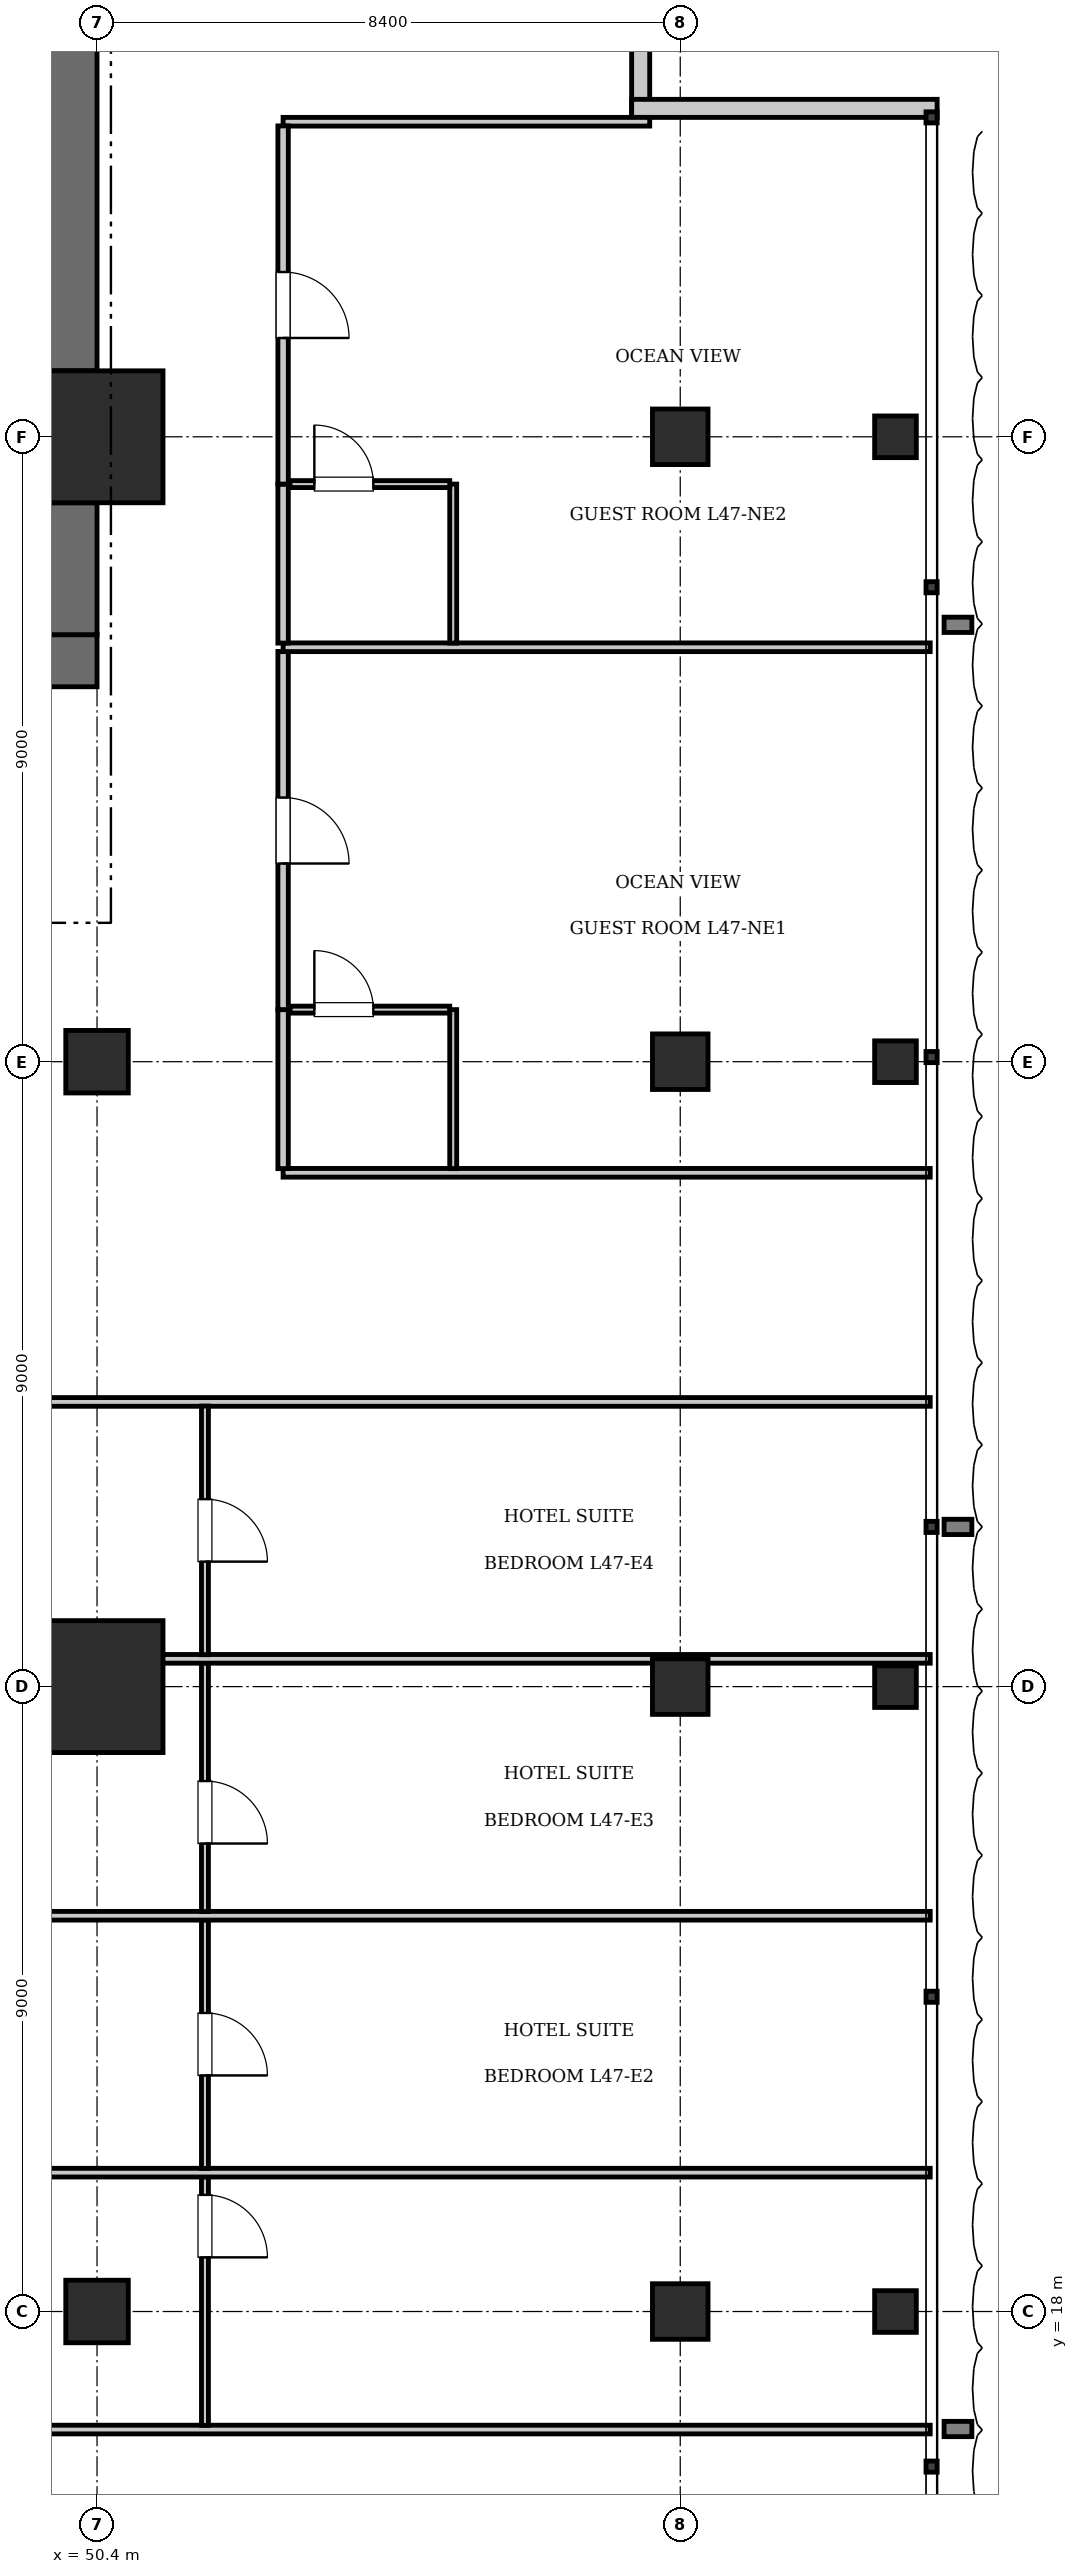
"""IFC4 building model, lengths in metres.
Left out: names, types, materials, properties, quantities, classifications, styles, units other than length and angle.
Written with IfcOpenShell. Run it as: python <this file> out.ifc"""

import sys

from ifc_helpers import new_model, si_unit, direction, frame, frame_2d, origin, origin_2d, place, context, subcontext, project, spatial, rectangle, i_section, extrude, element, fill, save


model = new_model("IFC4")
c1 = context("Model", 3, precision=1e-05, world=origin(), true_north=direction((0.0, 1.0)))
c2 = subcontext(c1, "Body", "Model", "MODEL_VIEW")
j1 = project(units=[si_unit("LENGTHUNIT", "METRE"), si_unit("PLANEANGLEUNIT", "RADIAN")], contexts=[c1])
p1 = place(None, origin())
s1 = spatial("IfcSite", under=j1, at=p1, CompositionType="ELEMENT")
p2 = place(p1, origin())
s2 = spatial("IfcBuilding", under=s1, at=p2, CompositionType="ELEMENT")
p3 = place(p2, frame((0.0, 0.0, 192.85)))
s3 = spatial("IfcBuildingStorey", under=s2, at=p3, CompositionType="ELEMENT", Elevation=192.85)
for number, where, z_axis, x_axis in (
    (1, (50.4, 27.0, 0.0), (0.0, 0.0, 1.0), (1.0, 0.0, 0.0)),
    (2, (50.4, 45.0, 0.0), (0.0, 0.0, 1.0), (1.0, 0.0, 0.0)),
):
    element("IfcColumn", number, at=place(p3, frame(where, z_axis=z_axis, x_axis=x_axis)), inside=s3, PredefinedType="COLUMN", context=c2, shape_type="SweptSolid", body=[
        extrude(rectangle(XDim=1.9, YDim=1.9, at=origin_2d()), origin(), (0.0, 0.0, 1.0), 3.85),
    ])
p4 = place(p3, frame((43.6, 41.775, 0.0), z_axis=(0.0, 0.0, 1.0), x_axis=(1.0, 0.0, 0.0)))
e3 = element("IfcWall", 3, at=p4, inside=s3, PredefinedType="SHEAR", context=c2, shape_type="SweptSolid", body=[
    extrude(rectangle(XDim=6.8, YDim=0.75, at=frame_2d((3.4, 0.0))), origin(), (0.0, 0.0, 1.0), 3.85),
])
p5 = place(p4, frame((3.9, 0.0, 0.0)))
e4 = element("IfcOpeningElement", 4, at=p5, cuts=e3, PredefinedType="OPENING", context=c2, shape_type="SweptSolid", body=[
    extrude(rectangle(XDim=1.15, YDim=2.15, at=frame_2d((0.575, 1.075))), frame((0.0, 0.385, 0.0), z_axis=(0.0, -1.0, 0.0), x_axis=(1.0, 0.0, 0.0)), (0.0, 0.0, 1.0), 0.77),
])
p6 = place(p4, frame((0.55, 0.0, 0.0)))
e5 = element("IfcOpeningElement", 5, at=p6, cuts=e3, PredefinedType="OPENING", context=c2, shape_type="SweptSolid", body=[
    extrude(rectangle(XDim=1.1, YDim=2.2, at=frame_2d((0.55, 1.1))), frame((0.0, 0.385, 0.0), z_axis=(0.0, -1.0, 0.0), x_axis=(1.0, 0.0, 0.0)), (0.0, 0.0, 1.0), 0.77),
])
p7 = place(p3, frame((50.025, 42.15, 0.0), z_axis=(0.0, 0.0, 1.0), x_axis=(0.0, 1.0, 0.0)))
e6 = element("IfcWall", 6, at=p7, inside=s3, PredefinedType="SHEAR", context=c2, shape_type="SweptSolid", body=[
    extrude(rectangle(XDim=1.9, YDim=0.75, at=frame_2d((0.95, 0.0))), origin(), (0.0, 0.0, 1.0), 3.85),
])
p8 = place(p3, frame((50.025, 45.95, 0.0), z_axis=(0.0, 0.0, 1.0), x_axis=(0.0, 1.0, 0.0)))
e7 = element("IfcWall", 7, at=p8, inside=s3, PredefinedType="SHEAR", context=c2, shape_type="SweptSolid", body=[
    extrude(rectangle(XDim=7.3, YDim=0.75, at=frame_2d((3.65, 0.0))), origin(), (0.0, 0.0, 1.0), 3.85),
])
for number, where, z_axis, x_axis in (
    (8, (50.4, 36.0, 0.0), (0.0, 0.0, 1.0), (1.0, 0.0, 0.0)),
    (9, (50.4, 18.0, 0.0), (0.0, 0.0, 1.0), (1.0, 0.0, 0.0)),
):
    element("IfcColumn", number, at=place(p3, frame(where, z_axis=z_axis, x_axis=x_axis)), inside=s3, PredefinedType="COLUMN", context=c2, shape_type="SweptSolid", body=[
        extrude(rectangle(XDim=0.9, YDim=0.9, at=origin_2d()), origin(), (0.0, 0.0, 1.0), 3.85),
    ])
for number, where, z_axis, x_axis in (
    (10, (58.8, 18.0, 0.0), (0.0, 0.0, 1.0), (1.0, 0.0, 0.0)),
    (11, (58.8, 27.0, 0.0), (0.0, 0.0, 1.0), (1.0, 0.0, 0.0)),
    (12, (58.8, 36.0, 0.0), (0.0, 0.0, 1.0), (1.0, 0.0, 0.0)),
    (13, (58.8, 45.0, 0.0), (0.0, 0.0, 1.0), (1.0, 0.0, 0.0)),
):
    element("IfcColumn", number, at=place(p3, frame(where, z_axis=z_axis, x_axis=x_axis)), inside=s3, PredefinedType="COLUMN", context=c2, shape_type="SweptSolid", body=[
        extrude(rectangle(XDim=0.8, YDim=0.8, at=origin_2d()), origin(), (0.0, 0.0, 1.0), 3.85),
    ])
for number, where, z_axis, x_axis in (
    (14, (61.9, 18.0, 0.0), (0.0, 0.0, 1.0), (1.0, 0.0, 0.0)),
    (15, (61.9, 27.0, 0.0), (0.0, 0.0, 1.0), (1.0, 0.0, 0.0)),
    (16, (61.9, 36.0, 0.0), (0.0, 0.0, 1.0), (1.0, 0.0, 0.0)),
    (17, (61.9, 45.0, 0.0), (0.0, 0.0, 1.0), (1.0, 0.0, 0.0)),
):
    element("IfcColumn", number, at=place(p3, frame(where, z_axis=z_axis, x_axis=x_axis)), inside=s3, PredefinedType="COLUMN", context=c2, shape_type="SweptSolid", body=[
        extrude(i_section(OverallWidth=0.6, OverallDepth=0.6, WebThickness=0.025, FlangeThickness=0.038, at=origin_2d()), origin(), (0.0, 0.0, 1.0), 3.85),
    ])
for number, where, z_axis, x_axis in (
    (18, (58.23, 54.0, 0.0), (0.0, 0.0, 1.0), (0.0, -1.0, 0.0)),
    (19, (58.1, 49.73, 0.0), (0.0, 0.0, 1.0), (1.0, 0.0, 0.0)),
):
    element("IfcWall", number, at=place(p3, frame(where, z_axis=z_axis, x_axis=x_axis)), inside=s3, PredefinedType="SOLIDWALL", context=c2, shape_type="SweptSolid", body=[
        extrude(rectangle(XDim=4.4, YDim=0.26, at=frame_2d((2.2, 0.0))), origin(), (0.0, 0.0, 1.0), 3.61),
    ])
for number, where, z_axis, x_axis in (
    (20, (38.08, 16.3, 0.0), (0.0, 0.0, 1.0), (1.0, 0.0, 0.0)),
    (21, (38.08, 31.1, 0.0), (0.0, 0.0, 1.0), (1.0, 0.0, 0.0)),
):
    element("IfcWall", number, at=place(p3, frame(where, z_axis=z_axis, x_axis=x_axis)), inside=s3, PredefinedType="PARTITIONING", context=c2, shape_type="SweptSolid", body=[
        extrude(rectangle(XDim=24.32, YDim=0.125, at=frame_2d((12.16, 0.0))), origin(), (0.0, 0.0, 1.0), 3.61),
    ])
p9 = place(p3, frame((51.954, 16.36, 0.0), z_axis=(0.0, 0.0, 1.0), x_axis=(0.0, 1.0, 0.0)))
e22 = element("IfcWall", 22, at=p9, inside=s3, PredefinedType="PARTITIONING", context=c2, shape_type="SweptSolid", body=[
    extrude(rectangle(XDim=3.58, YDim=0.1, at=frame_2d((1.79, 0.0))), origin(), (0.0, 0.0, 1.0), 3.61),
])
p10 = place(p9, frame((2.42, 0.0, 0.0)))
e23 = element("IfcOpeningElement", 23, at=p10, cuts=e22, PredefinedType="OPENING", context=c2, shape_type="SweptSolid", body=[
    extrude(rectangle(XDim=0.9, YDim=2.1, at=frame_2d((0.45, 1.05))), frame((0.0, 0.06, 0.0), z_axis=(0.0, -1.0, 0.0), x_axis=(1.0, 0.0, 0.0)), (0.0, 0.0, 1.0), 0.12),
])
p11 = place(p3, frame((38.08, 20.0, 0.0), z_axis=(0.0, 0.0, 1.0), x_axis=(1.0, 0.0, 0.0)))
e24 = element("IfcWall", 24, at=p11, inside=s3, PredefinedType="PARTITIONING", context=c2, shape_type="SweptSolid", body=[
    extrude(rectangle(XDim=24.32, YDim=0.125, at=frame_2d((12.16, 0.0))), origin(), (0.0, 0.0, 1.0), 3.61),
])
p12 = place(p3, frame((51.954, 20.06, 0.0), z_axis=(0.0, 0.0, 1.0), x_axis=(0.0, 1.0, 0.0)))
e25 = element("IfcWall", 25, at=p12, inside=s3, PredefinedType="PARTITIONING", context=c2, shape_type="SweptSolid", body=[
    extrude(rectangle(XDim=3.58, YDim=0.1, at=frame_2d((1.79, 0.0))), origin(), (0.0, 0.0, 1.0), 3.61),
])
p13 = place(p12, frame((1.34, 0.0, 0.0)))
e26 = element("IfcOpeningElement", 26, at=p13, cuts=e25, PredefinedType="OPENING", context=c2, shape_type="SweptSolid", body=[
    extrude(rectangle(XDim=0.9, YDim=2.1, at=frame_2d((0.45, 1.05))), frame((0.0, 0.06, 0.0), z_axis=(0.0, -1.0, 0.0), x_axis=(1.0, 0.0, 0.0)), (0.0, 0.0, 1.0), 0.12),
])
p14 = place(p3, frame((38.08, 23.7, 0.0), z_axis=(0.0, 0.0, 1.0), x_axis=(1.0, 0.0, 0.0)))
e27 = element("IfcWall", 27, at=p14, inside=s3, PredefinedType="PARTITIONING", context=c2, shape_type="SweptSolid", body=[
    extrude(rectangle(XDim=24.32, YDim=0.125, at=frame_2d((12.16, 0.0))), origin(), (0.0, 0.0, 1.0), 3.61),
])
p15 = place(p3, frame((51.954, 23.76, 0.0), z_axis=(0.0, 0.0, 1.0), x_axis=(0.0, 1.0, 0.0)))
e28 = element("IfcWall", 28, at=p15, inside=s3, PredefinedType="PARTITIONING", context=c2, shape_type="SweptSolid", body=[
    extrude(rectangle(XDim=3.58, YDim=0.1, at=frame_2d((1.79, 0.0))), origin(), (0.0, 0.0, 1.0), 3.61),
])
p16 = place(p15, frame((0.98, 0.0, 0.0)))
e29 = element("IfcOpeningElement", 29, at=p16, cuts=e28, PredefinedType="OPENING", context=c2, shape_type="SweptSolid", body=[
    extrude(rectangle(XDim=0.9, YDim=2.1, at=frame_2d((0.45, 1.05))), frame((0.0, 0.06, 0.0), z_axis=(0.0, -1.0, 0.0), x_axis=(1.0, 0.0, 0.0)), (0.0, 0.0, 1.0), 0.12),
])
p17 = place(p3, frame((38.08, 27.4, 0.0), z_axis=(0.0, 0.0, 1.0), x_axis=(1.0, 0.0, 0.0)))
e30 = element("IfcWall", 30, at=p17, inside=s3, PredefinedType="PARTITIONING", context=c2, shape_type="SweptSolid", body=[
    extrude(rectangle(XDim=24.32, YDim=0.125, at=frame_2d((12.16, 0.0))), origin(), (0.0, 0.0, 1.0), 3.61),
])
p18 = place(p3, frame((51.954, 27.46, 0.0), z_axis=(0.0, 0.0, 1.0), x_axis=(0.0, 1.0, 0.0)))
e31 = element("IfcWall", 31, at=p18, inside=s3, PredefinedType="PARTITIONING", context=c2, shape_type="SweptSolid", body=[
    extrude(rectangle(XDim=3.58, YDim=0.1, at=frame_2d((1.79, 0.0))), origin(), (0.0, 0.0, 1.0), 3.61),
])
p19 = place(p18, frame((1.34, 0.0, 0.0)))
e32 = element("IfcOpeningElement", 32, at=p19, cuts=e31, PredefinedType="OPENING", context=c2, shape_type="SweptSolid", body=[
    extrude(rectangle(XDim=0.9, YDim=2.1, at=frame_2d((0.45, 1.05))), frame((0.0, 0.06, 0.0), z_axis=(0.0, -1.0, 0.0), x_axis=(1.0, 0.0, 0.0)), (0.0, 0.0, 1.0), 0.12),
])
p20 = place(p3, frame((53.08, 34.4, 0.0), z_axis=(0.0, 0.0, 1.0), x_axis=(1.0, 0.0, 0.0)))
e33 = element("IfcWall", 33, at=p20, inside=s3, PredefinedType="PARTITIONING", context=c2, shape_type="SweptSolid", body=[
    extrude(rectangle(XDim=9.32, YDim=0.125, at=frame_2d((4.66, 0.0))), origin(), (0.0, 0.0, 1.0), 3.61),
])
p21 = place(p3, frame((53.08, 49.538, 0.0), z_axis=(0.0, 0.0, 1.0), x_axis=(1.0, 0.0, 0.0)))
e34 = element("IfcWall", 34, at=p21, inside=s3, PredefinedType="PARTITIONING", context=c2, shape_type="SweptSolid", body=[
    extrude(rectangle(XDim=5.28, YDim=0.125, at=frame_2d((2.64, 0.0))), origin(), (0.0, 0.0, 1.0), 3.61),
])
p22 = place(p3, frame((53.08, 34.46, 0.0), z_axis=(0.0, 0.0, 1.0), x_axis=(0.0, 1.0, 0.0)))
e35 = element("IfcWall", 35, at=p22, inside=s3, PredefinedType="PARTITIONING", context=c2, shape_type="SweptSolid", body=[
    extrude(rectangle(XDim=2.29, YDim=0.15, at=frame_2d((1.145, 0.0))), origin(), (0.0, 0.0, 1.0), 3.61),
])
p23 = place(p3, frame((53.08, 36.75, 0.0), z_axis=(0.0, 0.0, 1.0), x_axis=(0.0, 1.0, 0.0)))
e36 = element("IfcWall", 36, at=p23, inside=s3, PredefinedType="PARTITIONING", context=c2, shape_type="SweptSolid", body=[
    extrude(rectangle(XDim=5.159, YDim=0.15, at=frame_2d((2.579, 0.0))), origin(), (0.0, 0.0, 1.0), 3.61),
])
p24 = place(p23, frame((2.104, 0.0, 0.0)))
e37 = element("IfcOpeningElement", 37, at=p24, cuts=e36, PredefinedType="OPENING", context=c2, shape_type="SweptSolid", body=[
    extrude(rectangle(XDim=0.95, YDim=2.15, at=frame_2d((0.475, 1.075))), frame((0.0, 0.085, 0.0), z_axis=(0.0, -1.0, 0.0), x_axis=(1.0, 0.0, 0.0)), (0.0, 0.0, 1.0), 0.17),
])
p25 = place(p3, frame((55.53, 34.46, 0.0), z_axis=(0.0, 0.0, 1.0), x_axis=(0.0, 1.0, 0.0)))
e38 = element("IfcWall", 38, at=p25, inside=s3, PredefinedType="PARTITIONING", context=c2, shape_type="SweptSolid", body=[
    extrude(rectangle(XDim=2.29, YDim=0.1, at=frame_2d((1.145, 0.0))), origin(), (0.0, 0.0, 1.0), 3.61),
])
p26 = place(p3, frame((53.18, 36.75, 0.0), z_axis=(0.0, 0.0, 1.0), x_axis=(1.0, 0.0, 0.0)))
e39 = element("IfcWall", 39, at=p26, inside=s3, PredefinedType="PARTITIONING", context=c2, shape_type="SweptSolid", body=[
    extrude(rectangle(XDim=2.3, YDim=0.1, at=frame_2d((1.15, 0.0))), origin(), (0.0, 0.0, 1.0), 3.61),
])
p27 = place(p26, frame((0.35, 0.0, 0.0)))
e40 = element("IfcOpeningElement", 40, at=p27, cuts=e39, PredefinedType="OPENING", context=c2, shape_type="SweptSolid", body=[
    extrude(rectangle(XDim=0.85, YDim=2.1, at=frame_2d((0.425, 1.05))), frame((0.0, 0.06, 0.0), z_axis=(0.0, -1.0, 0.0), x_axis=(1.0, 0.0, 0.0)), (0.0, 0.0, 1.0), 0.12),
])
p28 = place(p3, frame((53.08, 41.969, 0.0), z_axis=(0.0, 0.0, 1.0), x_axis=(1.0, 0.0, 0.0)))
e41 = element("IfcWall", 41, at=p28, inside=s3, PredefinedType="PARTITIONING", context=c2, shape_type="SweptSolid", body=[
    extrude(rectangle(XDim=9.32, YDim=0.125, at=frame_2d((4.66, 0.0))), origin(), (0.0, 0.0, 1.0), 3.61),
])
p29 = place(p3, frame((53.08, 42.029, 0.0), z_axis=(0.0, 0.0, 1.0), x_axis=(0.0, 1.0, 0.0)))
e42 = element("IfcWall", 42, at=p29, inside=s3, PredefinedType="PARTITIONING", context=c2, shape_type="SweptSolid", body=[
    extrude(rectangle(XDim=2.29, YDim=0.15, at=frame_2d((1.145, 0.0))), origin(), (0.0, 0.0, 1.0), 3.61),
])
p30 = place(p3, frame((53.08, 44.319, 0.0), z_axis=(0.0, 0.0, 1.0), x_axis=(0.0, 1.0, 0.0)))
e43 = element("IfcWall", 43, at=p30, inside=s3, PredefinedType="PARTITIONING", context=c2, shape_type="SweptSolid", body=[
    extrude(rectangle(XDim=5.159, YDim=0.15, at=frame_2d((2.579, 0.0))), origin(), (0.0, 0.0, 1.0), 3.61),
])
p31 = place(p30, frame((2.104, 0.0, 0.0)))
e44 = element("IfcOpeningElement", 44, at=p31, cuts=e43, PredefinedType="OPENING", context=c2, shape_type="SweptSolid", body=[
    extrude(rectangle(XDim=0.95, YDim=2.15, at=frame_2d((0.475, 1.075))), frame((0.0, 0.085, 0.0), z_axis=(0.0, -1.0, 0.0), x_axis=(1.0, 0.0, 0.0)), (0.0, 0.0, 1.0), 0.17),
])
p32 = place(p3, frame((55.53, 42.029, 0.0), z_axis=(0.0, 0.0, 1.0), x_axis=(0.0, 1.0, 0.0)))
e45 = element("IfcWall", 45, at=p32, inside=s3, PredefinedType="PARTITIONING", context=c2, shape_type="SweptSolid", body=[
    extrude(rectangle(XDim=2.29, YDim=0.1, at=frame_2d((1.145, 0.0))), origin(), (0.0, 0.0, 1.0), 3.61),
])
p33 = place(p3, frame((53.18, 44.319, 0.0), z_axis=(0.0, 0.0, 1.0), x_axis=(1.0, 0.0, 0.0)))
e46 = element("IfcWall", 46, at=p33, inside=s3, PredefinedType="PARTITIONING", context=c2, shape_type="SweptSolid", body=[
    extrude(rectangle(XDim=2.3, YDim=0.1, at=frame_2d((1.15, 0.0))), origin(), (0.0, 0.0, 1.0), 3.61),
])
p34 = place(p33, frame((0.35, 0.0, 0.0)))
e47 = element("IfcOpeningElement", 47, at=p34, cuts=e46, PredefinedType="OPENING", context=c2, shape_type="SweptSolid", body=[
    extrude(rectangle(XDim=0.85, YDim=2.1, at=frame_2d((0.425, 1.05))), frame((0.0, 0.06, 0.0), z_axis=(0.0, -1.0, 0.0), x_axis=(1.0, 0.0, 0.0)), (0.0, 0.0, 1.0), 0.12),
])
p35 = place(p10, frame((0.9, 0.0, 0.0), z_axis=(0.0, 0.0, 1.0), x_axis=(-1.0, 0.0, 0.0)))
e48 = element("IfcDoor", 48, at=p35, inside=s3, OperationType="SINGLE_SWING_RIGHT", PredefinedType="DOOR", context=c2, shape_type="SweptSolid", body=[
    extrude(rectangle(XDim=0.9, YDim=2.1, at=frame_2d((0.45, 1.05))), frame((0.0, 0.025, 0.0), z_axis=(0.0, -1.0, 0.0), x_axis=(1.0, 0.0, 0.0)), (0.0, 0.0, 1.0), 0.05),
])
fill(e23, e48)
p36 = place(p13, frame((0.9, 0.0, 0.0), z_axis=(0.0, 0.0, 1.0), x_axis=(-1.0, 0.0, 0.0)))
e49 = element("IfcDoor", 49, at=p36, inside=s3, OperationType="SINGLE_SWING_RIGHT", PredefinedType="DOOR", context=c2, shape_type="SweptSolid", body=[
    extrude(rectangle(XDim=0.9, YDim=2.1, at=frame_2d((0.45, 1.05))), frame((0.0, 0.025, 0.0), z_axis=(0.0, -1.0, 0.0), x_axis=(1.0, 0.0, 0.0)), (0.0, 0.0, 1.0), 0.05),
])
fill(e26, e49)
p37 = place(p16, frame((0.9, 0.0, 0.0), z_axis=(0.0, 0.0, 1.0), x_axis=(-1.0, 0.0, 0.0)))
e50 = element("IfcDoor", 50, at=p37, inside=s3, OperationType="SINGLE_SWING_RIGHT", PredefinedType="DOOR", context=c2, shape_type="SweptSolid", body=[
    extrude(rectangle(XDim=0.9, YDim=2.1, at=frame_2d((0.45, 1.05))), frame((0.0, 0.025, 0.0), z_axis=(0.0, -1.0, 0.0), x_axis=(1.0, 0.0, 0.0)), (0.0, 0.0, 1.0), 0.05),
])
fill(e29, e50)
p38 = place(p19, frame((0.9, 0.0, 0.0), z_axis=(0.0, 0.0, 1.0), x_axis=(-1.0, 0.0, 0.0)))
e51 = element("IfcDoor", 51, at=p38, inside=s3, OperationType="SINGLE_SWING_RIGHT", PredefinedType="DOOR", context=c2, shape_type="SweptSolid", body=[
    extrude(rectangle(XDim=0.9, YDim=2.1, at=frame_2d((0.45, 1.05))), frame((0.0, 0.025, 0.0), z_axis=(0.0, -1.0, 0.0), x_axis=(1.0, 0.0, 0.0)), (0.0, 0.0, 1.0), 0.05),
])
fill(e32, e51)
p39 = place(p27, origin())
e52 = element("IfcDoor", 52, at=p39, inside=s3, OperationType="SINGLE_SWING_LEFT", PredefinedType="DOOR", context=c2, shape_type="SweptSolid", body=[
    extrude(rectangle(XDim=0.85, YDim=2.1, at=frame_2d((0.425, 1.05))), frame((0.0, 0.025, 0.0), z_axis=(0.0, -1.0, 0.0), x_axis=(1.0, 0.0, 0.0)), (0.0, 0.0, 1.0), 0.05),
])
fill(e40, e52)
p40 = place(p24, frame((0.95, 0.0, 0.0), z_axis=(0.0, 0.0, 1.0), x_axis=(-1.0, 0.0, 0.0)))
e53 = element("IfcDoor", 53, at=p40, inside=s3, OperationType="SINGLE_SWING_RIGHT", PredefinedType="DOOR", context=c2, shape_type="SweptSolid", body=[
    extrude(rectangle(XDim=0.95, YDim=2.15, at=frame_2d((0.475, 1.075))), frame((0.0, 0.025, 0.0), z_axis=(0.0, -1.0, 0.0), x_axis=(1.0, 0.0, 0.0)), (0.0, 0.0, 1.0), 0.05),
])
fill(e37, e53)
p41 = place(p34, origin())
e54 = element("IfcDoor", 54, at=p41, inside=s3, OperationType="SINGLE_SWING_LEFT", PredefinedType="DOOR", context=c2, shape_type="SweptSolid", body=[
    extrude(rectangle(XDim=0.85, YDim=2.1, at=frame_2d((0.425, 1.05))), frame((0.0, 0.025, 0.0), z_axis=(0.0, -1.0, 0.0), x_axis=(1.0, 0.0, 0.0)), (0.0, 0.0, 1.0), 0.05),
])
fill(e47, e54)
p42 = place(p31, frame((0.95, 0.0, 0.0), z_axis=(0.0, 0.0, 1.0), x_axis=(-1.0, 0.0, 0.0)))
e55 = element("IfcDoor", 55, at=p42, inside=s3, OperationType="SINGLE_SWING_RIGHT", PredefinedType="DOOR", context=c2, shape_type="SweptSolid", body=[
    extrude(rectangle(XDim=0.95, YDim=2.15, at=frame_2d((0.475, 1.075))), frame((0.0, 0.025, 0.0), z_axis=(0.0, -1.0, 0.0), x_axis=(1.0, 0.0, 0.0)), (0.0, 0.0, 1.0), 0.05),
])
fill(e44, e55)
save(model, sys.argv[1])
